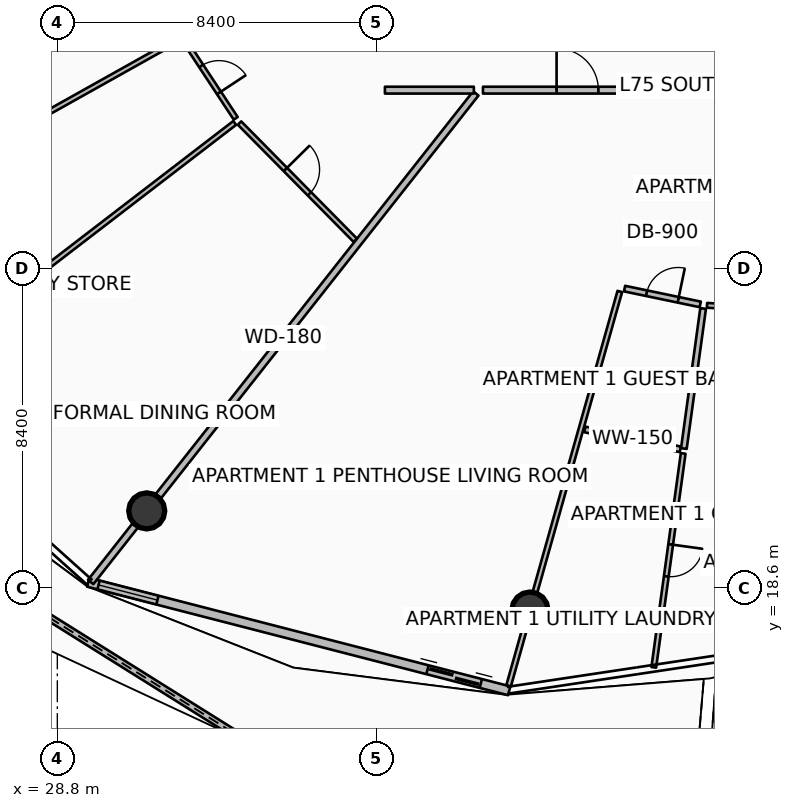
"""IFC4 building model, lengths in metres.
Left out: names, types, materials, properties, quantities, classifications, styles, units other than length and angle.
Written with IfcOpenShell. Run it as: python <this file> out.ifc"""

import sys

from ifc_helpers import new_model, si_unit, direction, frame, frame_2d, origin, origin_2d, place, context, subcontext, project, spatial, polyline, rectangle, circle, outline, extrude, element, fill, save


model = new_model("IFC4")
c1 = context("Model", 3, precision=1e-05, world=origin(), true_north=direction((0.0, 1.0)))
c2 = subcontext(c1, "Body", "Model", "MODEL_VIEW")
j1 = project(units=[si_unit("LENGTHUNIT", "METRE"), si_unit("PLANEANGLEUNIT", "RADIAN")], contexts=[c1])
p1 = place(None, origin())
s1 = spatial("IfcSite", under=j1, at=p1, CompositionType="ELEMENT")
p2 = place(p1, origin())
s2 = spatial("IfcBuilding", under=s1, at=p2, CompositionType="ELEMENT")
p3 = place(p2, frame((0.0, 0.0, 298.3)))
s3 = spatial("IfcBuildingStorey", under=s2, at=p3, CompositionType="ELEMENT", Elevation=298.3)
for number, where, z_axis, x_axis in (
    (1, (31.153, 20.629, 0.0), (0.0, 0.0, 1.0), (1.0, 0.0, 0.0)),
    (2, (41.237, 18.021, 0.0), (0.0, 0.0, 1.0), (1.0, 0.0, 0.0)),
):
    element("IfcColumn", number, at=place(p3, frame(where, z_axis=z_axis, x_axis=x_axis)), inside=s3, PredefinedType="COLUMN", context=c2, shape_type="SweptSolid", body=[
        extrude(circle(Radius=0.475, at=origin_2d()), origin(), (0.0, 0.0, 1.0), 3.59),
    ])
p4 = place(p3, frame((23.629, 20.926, 0.0), z_axis=(0.0, 0.0, 1.0), x_axis=(0.847743764475, -0.53040598582, 0.0)))
e3 = element("IfcWall", 3, at=p4, inside=s3, PredefinedType="PARAPET", context=c2, shape_type="SweptSolid", body=[
    extrude(outline(polyline([(0.0, 0.0), (12.075, 0.0), (12.075, 1.632), (6.037, 1.418), (0.0, 1.233), (0.0, 0.0)])), frame((0.0, 0.09, 0.0), z_axis=(0.0, -1.0, 0.0), x_axis=(1.0, 0.0, 0.0)), (0.0, 0.0, 1.0), 0.18),
])
p5 = place(p3, frame((45.942, 13.635, 0.0), z_axis=(0.0, 0.0, 1.0), x_axis=(0.962462930889, 0.271413165976, 0.0)))
e4 = element("IfcWall", 4, at=p5, inside=s3, PredefinedType="PARAPET", context=c2, shape_type="SweptSolid", body=[
    extrude(outline(polyline([(0.0, 0.0), (10.611, 0.0), (10.611, 1.632), (5.305, 1.798), (0.0, 1.86), (0.0, 0.0)])), frame((0.0, 0.09, 0.0), z_axis=(0.0, -1.0, 0.0), x_axis=(1.0, 0.0, 0.0)), (0.0, 0.0, 1.0), 0.18),
])
p6 = place(p3, frame((29.614, 18.751, 0.0), z_axis=(0.0, 0.0, 1.0), x_axis=(0.968343758421, -0.249620442927, 0.0)))
e5 = element("IfcWall", 5, at=p6, inside=s3, PredefinedType="SOLIDWALL", context=c2, shape_type="SweptSolid", body=[
    extrude(rectangle(XDim=11.438, YDim=0.24, at=frame_2d((5.719, 0.0))), origin(), (0.0, 0.0, 1.0), 2.54),
])
p7 = place(p6, frame((9.218, 0.0, 0.0)))
e6 = element("IfcOpeningElement", 6, at=p7, cuts=e5, PredefinedType="OPENING", context=c2, shape_type="SweptSolid", body=[
    extrude(rectangle(XDim=1.45, YDim=2.15, at=frame_2d((0.725, 1.075))), frame((0.0, 0.13, 0.0), z_axis=(0.0, -1.0, 0.0), x_axis=(1.0, 0.0, 0.0)), (0.0, 0.0, 1.0), 0.26),
])
p8 = place(p6, frame((0.28, 0.0, 0.65)))
e7 = element("IfcOpeningElement", 7, at=p8, cuts=e5, PredefinedType="OPENING", context=c2, shape_type="SweptSolid", body=[
    extrude(rectangle(XDim=1.6, YDim=1.5, at=frame_2d((0.8, 0.75))), frame((0.0, 0.13, 0.0), z_axis=(0.0, -1.0, 0.0), x_axis=(1.0, 0.0, 0.0)), (0.0, 0.0, 1.0), 0.26),
])
p9 = place(p3, frame((39.812, 31.614, 0.0), z_axis=(0.0, 0.0, 1.0), x_axis=(-0.619097230176, -0.785314344443, 0.0)))
e8 = element("IfcWall", 8, at=p9, inside=s3, PredefinedType="PARTITIONING", context=c2, shape_type="SweptSolid", body=[
    extrude(rectangle(XDim=16.37, YDim=0.18, at=frame_2d((8.185, 0.0))), origin(), (0.0, 0.0, 1.0), 2.957),
])
p10 = place(p3, frame((40.0, 31.7, 0.0), z_axis=(0.0, 0.0, 1.0), x_axis=(1.0, 0.0, 0.0)))
e9 = element("IfcWall", 9, at=p10, inside=s3, PredefinedType="PARTITIONING", context=c2, shape_type="SweptSolid", body=[
    extrude(rectangle(XDim=4.975, YDim=0.18, at=frame_2d((2.488, 0.0))), origin(), (0.0, 0.0, 1.0), 2.957),
])
p11 = place(p10, frame((1.938, 0.0, 0.0)))
e10 = element("IfcOpeningElement", 10, at=p11, cuts=e9, PredefinedType="OPENING", context=c2, shape_type="SweptSolid", body=[
    extrude(rectangle(XDim=1.1, YDim=2.1, at=frame_2d((0.55, 1.05))), frame((0.0, 0.1, 0.0), z_axis=(0.0, -1.0, 0.0), x_axis=(1.0, 0.0, 0.0)), (0.0, 0.0, 1.0), 0.2),
])
p12 = place(p3, frame((45.215, 31.7, 0.0), z_axis=(0.0, 0.0, 1.0), x_axis=(1.0, 0.0, 0.0)))
e11 = element("IfcWall", 11, at=p12, inside=s3, PredefinedType="PARTITIONING", context=c2, shape_type="SweptSolid", body=[
    extrude(rectangle(XDim=3.884, YDim=0.18, at=frame_2d((1.942, 0.0))), origin(), (0.0, 0.0, 1.0), 2.957),
])
p13 = place(p3, frame((43.601, 26.403, 0.0), z_axis=(0.0, 0.0, 1.0), x_axis=(-0.271440797747, -0.962455138341, 0.0)))
e12 = element("IfcWall", 12, at=p13, inside=s3, PredefinedType="PARTITIONING", context=c2, shape_type="SweptSolid", body=[
    extrude(rectangle(XDim=10.779, YDim=0.125, at=frame_2d((5.389, 0.0))), origin(), (0.0, 0.0, 1.0), 2.957),
])
p14 = place(p3, frame((43.726, 26.478, 0.0), z_axis=(0.0, 0.0, 1.0), x_axis=(0.978898482471, -0.204347158084, 0.0)))
e13 = element("IfcWall", 13, at=p14, inside=s3, PredefinedType="PARTITIONING", context=c2, shape_type="SweptSolid", body=[
    extrude(rectangle(XDim=2.035, YDim=0.15, at=frame_2d((1.017, 0.0))), origin(), (0.0, 0.0, 1.0), 2.957),
])
p15 = place(p14, frame((0.592, 0.0, 0.0)))
e14 = element("IfcOpeningElement", 14, at=p15, cuts=e13, PredefinedType="OPENING", context=c2, shape_type="SweptSolid", body=[
    extrude(rectangle(XDim=0.85, YDim=2.06, at=frame_2d((0.425, 1.03))), frame((0.0, 0.085, 0.0), z_axis=(0.0, -1.0, 0.0), x_axis=(1.0, 0.0, 0.0)), (0.0, 0.0, 1.0), 0.17),
])
p16 = place(p3, frame((42.681, 22.773, 0.0), z_axis=(0.0, 0.0, 1.0), x_axis=(0.978918641327, -0.204250565882, 0.0)))
e15 = element("IfcWall", 15, at=p16, inside=s3, PredefinedType="PARTITIONING", context=c2, shape_type="SweptSolid", body=[
    extrude(rectangle(XDim=2.566, YDim=0.15, at=frame_2d((1.283, 0.0))), origin(), (0.0, 0.0, 1.0), 2.957),
])
p17 = place(p3, frame((45.793, 25.955, 0.0), z_axis=(0.0, 0.0, 1.0), x_axis=(-0.136246520483, -0.990674964686, 0.0)))
e16 = element("IfcWall", 16, at=p17, inside=s3, PredefinedType="PARTITIONING", context=c2, shape_type="SweptSolid", body=[
    extrude(rectangle(XDim=3.72, YDim=0.15, at=frame_2d((1.86, 0.0))), origin(), (0.0, 0.0, 1.0), 3.03),
])
p18 = place(p3, frame((45.269, 22.141, 0.0), z_axis=(0.0, 0.0, 1.0), x_axis=(-0.136209906248, -0.990679999515, 0.0)))
e17 = element("IfcWall", 17, at=p18, inside=s3, PredefinedType="PARTITIONING", context=c2, shape_type="SweptSolid", body=[
    extrude(rectangle(XDim=5.682, YDim=0.125, at=frame_2d((2.841, 0.0))), origin(), (0.0, 0.0, 1.0), 3.03),
])
p19 = place(p18, frame((2.416, 0.0, 0.0)))
e18 = element("IfcOpeningElement", 18, at=p19, cuts=e17, PredefinedType="OPENING", context=c2, shape_type="SweptSolid", body=[
    extrude(rectangle(XDim=0.85, YDim=2.06, at=frame_2d((0.425, 1.03))), frame((0.0, 0.073, 0.0), z_axis=(0.0, -1.0, 0.0), x_axis=(1.0, 0.0, 0.0)), (0.0, 0.0, 1.0), 0.145),
])
p20 = place(p3, frame((45.896, 26.038, 0.0), z_axis=(0.0, 0.0, 1.0), x_axis=(0.997945365671, -0.064070641766, 0.0)))
e19 = element("IfcWall", 19, at=p20, inside=s3, PredefinedType="PARTITIONING", context=c2, shape_type="SweptSolid", body=[
    extrude(rectangle(XDim=2.164, YDim=0.125, at=frame_2d((1.082, 0.0))), origin(), (0.0, 0.0, 1.0), 3.03),
])
p21 = place(p20, frame((0.657, 0.0, 0.0)))
e20 = element("IfcOpeningElement", 20, at=p21, cuts=e19, PredefinedType="OPENING", context=c2, shape_type="SweptSolid", body=[
    extrude(rectangle(XDim=0.85, YDim=2.06, at=frame_2d((0.425, 1.03))), frame((0.0, 0.073, 0.0), z_axis=(0.0, -1.0, 0.0), x_axis=(1.0, 0.0, 0.0)), (0.0, 0.0, 1.0), 0.145),
])
p22 = place(p3, frame((30.961, 35.254, 0.0), z_axis=(0.0, 0.0, 1.0), x_axis=(-0.929771128666, -0.368138083195, 0.0)))
e21 = element("IfcWall", 21, at=p22, inside=s3, PredefinedType="PARTITIONING", context=c2, shape_type="SweptSolid", body=[
    extrude(rectangle(XDim=11.578, YDim=0.125, at=frame_2d((5.789, 0.0))), origin(), (0.0, 0.0, 1.0), 3.03),
])
p23 = place(p3, frame((37.42, 31.7, 0.0), z_axis=(0.0, 0.0, 1.0), x_axis=(1.0, 0.0, 0.0)))
e22 = element("IfcWall", 22, at=p23, inside=s3, PredefinedType="PARTITIONING", context=c2, shape_type="SweptSolid", body=[
    extrude(rectangle(XDim=2.34, YDim=0.18, at=frame_2d((1.17, 0.0))), origin(), (0.0, 0.0, 1.0), 2.957),
])
p24 = place(p3, frame((32.002, 33.041, 0.0), z_axis=(0.0, 0.0, 1.0), x_axis=(-0.872499131003, -0.488615663276, 0.0)))
e23 = element("IfcWall", 23, at=p24, inside=s3, PredefinedType="PARTITIONING", context=c2, shape_type="SweptSolid", body=[
    extrude(rectangle(XDim=12.094, YDim=0.125, at=frame_2d((6.047, 0.0))), origin(), (0.0, 0.0, 1.0), 2.957),
])
p25 = place(p3, frame((33.467, 30.836, 0.0), z_axis=(0.0, 0.0, 1.0), x_axis=(-0.793032685216, -0.609179087115, 0.0)))
e24 = element("IfcWall", 24, at=p25, inside=s3, PredefinedType="PARTITIONING", context=c2, shape_type="SweptSolid", body=[
    extrude(rectangle(XDim=11.72, YDim=0.125, at=frame_2d((5.86, 0.0))), origin(), (0.0, 0.0, 1.0), 3.03),
])
p26 = place(p3, frame((32.144, 33.006, 0.0), z_axis=(0.0, 0.0, 1.0), x_axis=(0.550305477067, -0.83496340154, 0.0)))
e25 = element("IfcWall", 25, at=p26, inside=s3, PredefinedType="PARTITIONING", context=c2, shape_type="SweptSolid", body=[
    extrude(rectangle(XDim=2.453, YDim=0.125, at=frame_2d((1.227, 0.0))), origin(), (0.0, 0.0, 1.0), 2.957),
])
p27 = place(p26, frame((0.802, 0.0, 0.0)))
e26 = element("IfcOpeningElement", 26, at=p27, cuts=e25, PredefinedType="OPENING", context=c2, shape_type="SweptSolid", body=[
    extrude(rectangle(XDim=0.85, YDim=2.06, at=frame_2d((0.425, 1.03))), frame((0.0, 0.073, 0.0), z_axis=(0.0, -1.0, 0.0), x_axis=(1.0, 0.0, 0.0)), (0.0, 0.0, 1.0), 0.145),
])
p28 = place(p3, frame((33.594, 30.834, 0.0), z_axis=(0.0, 0.0, 1.0), x_axis=(0.702642820289, -0.711542737365, 0.0)))
e27 = element("IfcWall", 27, at=p28, inside=s3, PredefinedType="PARTITIONING", context=c2, shape_type="SweptSolid", body=[
    extrude(rectangle(XDim=4.334, YDim=0.125, at=frame_2d((2.167, 0.0))), origin(), (0.0, 0.0, 1.0), 2.957),
])
p29 = place(p28, frame((1.717, 0.0, 0.0)))
e28 = element("IfcOpeningElement", 28, at=p29, cuts=e27, PredefinedType="OPENING", context=c2, shape_type="SweptSolid", body=[
    extrude(rectangle(XDim=0.9, YDim=2.08, at=frame_2d((0.45, 1.04))), frame((0.0, 0.073, 0.0), z_axis=(0.0, -1.0, 0.0), x_axis=(1.0, 0.0, 0.0)), (0.0, 0.0, 1.0), 0.145),
])
p30 = place(p7, origin())
e29 = element("IfcDoor", 29, at=p30, inside=s3, OperationType="DOUBLE_DOOR_SLIDING", PredefinedType="DOOR", context=c2, shape_type="SweptSolid", body=[
    extrude(rectangle(XDim=1.45, YDim=2.15, at=frame_2d((0.725, 1.075))), frame((0.0, 0.025, 0.0), z_axis=(0.0, -1.0, 0.0), x_axis=(1.0, 0.0, 0.0)), (0.0, 0.0, 1.0), 0.05),
])
fill(e6, e29)
p31 = place(p8, origin())
e30 = element("IfcWindow", 30, at=p31, inside=s3, PartitioningType="SINGLE_PANEL", PredefinedType="WINDOW", context=c2, shape_type="SweptSolid", body=[
    extrude(rectangle(XDim=1.6, YDim=1.5, at=frame_2d((0.8, 0.75))), frame((0.0, 0.03, 0.0), z_axis=(0.0, -1.0, 0.0), x_axis=(1.0, 0.0, 0.0)), (0.0, 0.0, 1.0), 0.06),
])
fill(e7, e30)
p32 = place(p11, origin())
e31 = element("IfcDoor", 31, at=p32, inside=s3, OperationType="SINGLE_SWING_LEFT", PredefinedType="DOOR", context=c2, shape_type="SweptSolid", body=[
    extrude(rectangle(XDim=1.1, YDim=2.1, at=frame_2d((0.55, 1.05))), frame((0.0, 0.025, 0.0), z_axis=(0.0, -1.0, 0.0), x_axis=(1.0, 0.0, 0.0)), (0.0, 0.0, 1.0), 0.05),
])
fill(e10, e31)
p33 = place(p15, origin())
e32 = element("IfcDoor", 32, at=p33, inside=s3, OperationType="SINGLE_SWING_RIGHT", PredefinedType="DOOR", context=c2, shape_type="SweptSolid", body=[
    extrude(rectangle(XDim=0.85, YDim=2.06, at=frame_2d((0.425, 1.03))), frame((0.0, 0.025, 0.0), z_axis=(0.0, -1.0, 0.0), x_axis=(1.0, 0.0, 0.0)), (0.0, 0.0, 1.0), 0.05),
])
fill(e14, e32)
p34 = place(p19, origin())
e33 = element("IfcDoor", 33, at=p34, inside=s3, OperationType="SINGLE_SWING_LEFT", PredefinedType="DOOR", context=c2, shape_type="SweptSolid", body=[
    extrude(rectangle(XDim=0.85, YDim=2.06, at=frame_2d((0.425, 1.03))), frame((0.0, 0.025, 0.0), z_axis=(0.0, -1.0, 0.0), x_axis=(1.0, 0.0, 0.0)), (0.0, 0.0, 1.0), 0.05),
])
fill(e18, e33)
p35 = place(p27, origin())
e34 = element("IfcDoor", 34, at=p35, inside=s3, OperationType="SINGLE_SWING_RIGHT", PredefinedType="DOOR", context=c2, shape_type="SweptSolid", body=[
    extrude(rectangle(XDim=0.85, YDim=2.06, at=frame_2d((0.425, 1.03))), frame((0.0, 0.025, 0.0), z_axis=(0.0, -1.0, 0.0), x_axis=(1.0, 0.0, 0.0)), (0.0, 0.0, 1.0), 0.05),
])
fill(e26, e34)
p36 = place(p29, origin())
e35 = element("IfcDoor", 35, at=p36, inside=s3, OperationType="SINGLE_SWING_LEFT", PredefinedType="DOOR", context=c2, shape_type="SweptSolid", body=[
    extrude(rectangle(XDim=0.9, YDim=2.08, at=frame_2d((0.45, 1.04))), frame((0.0, 0.025, 0.0), z_axis=(0.0, -1.0, 0.0), x_axis=(1.0, 0.0, 0.0)), (0.0, 0.0, 1.0), 0.05),
])
fill(e28, e35)
save(model, sys.argv[1])
